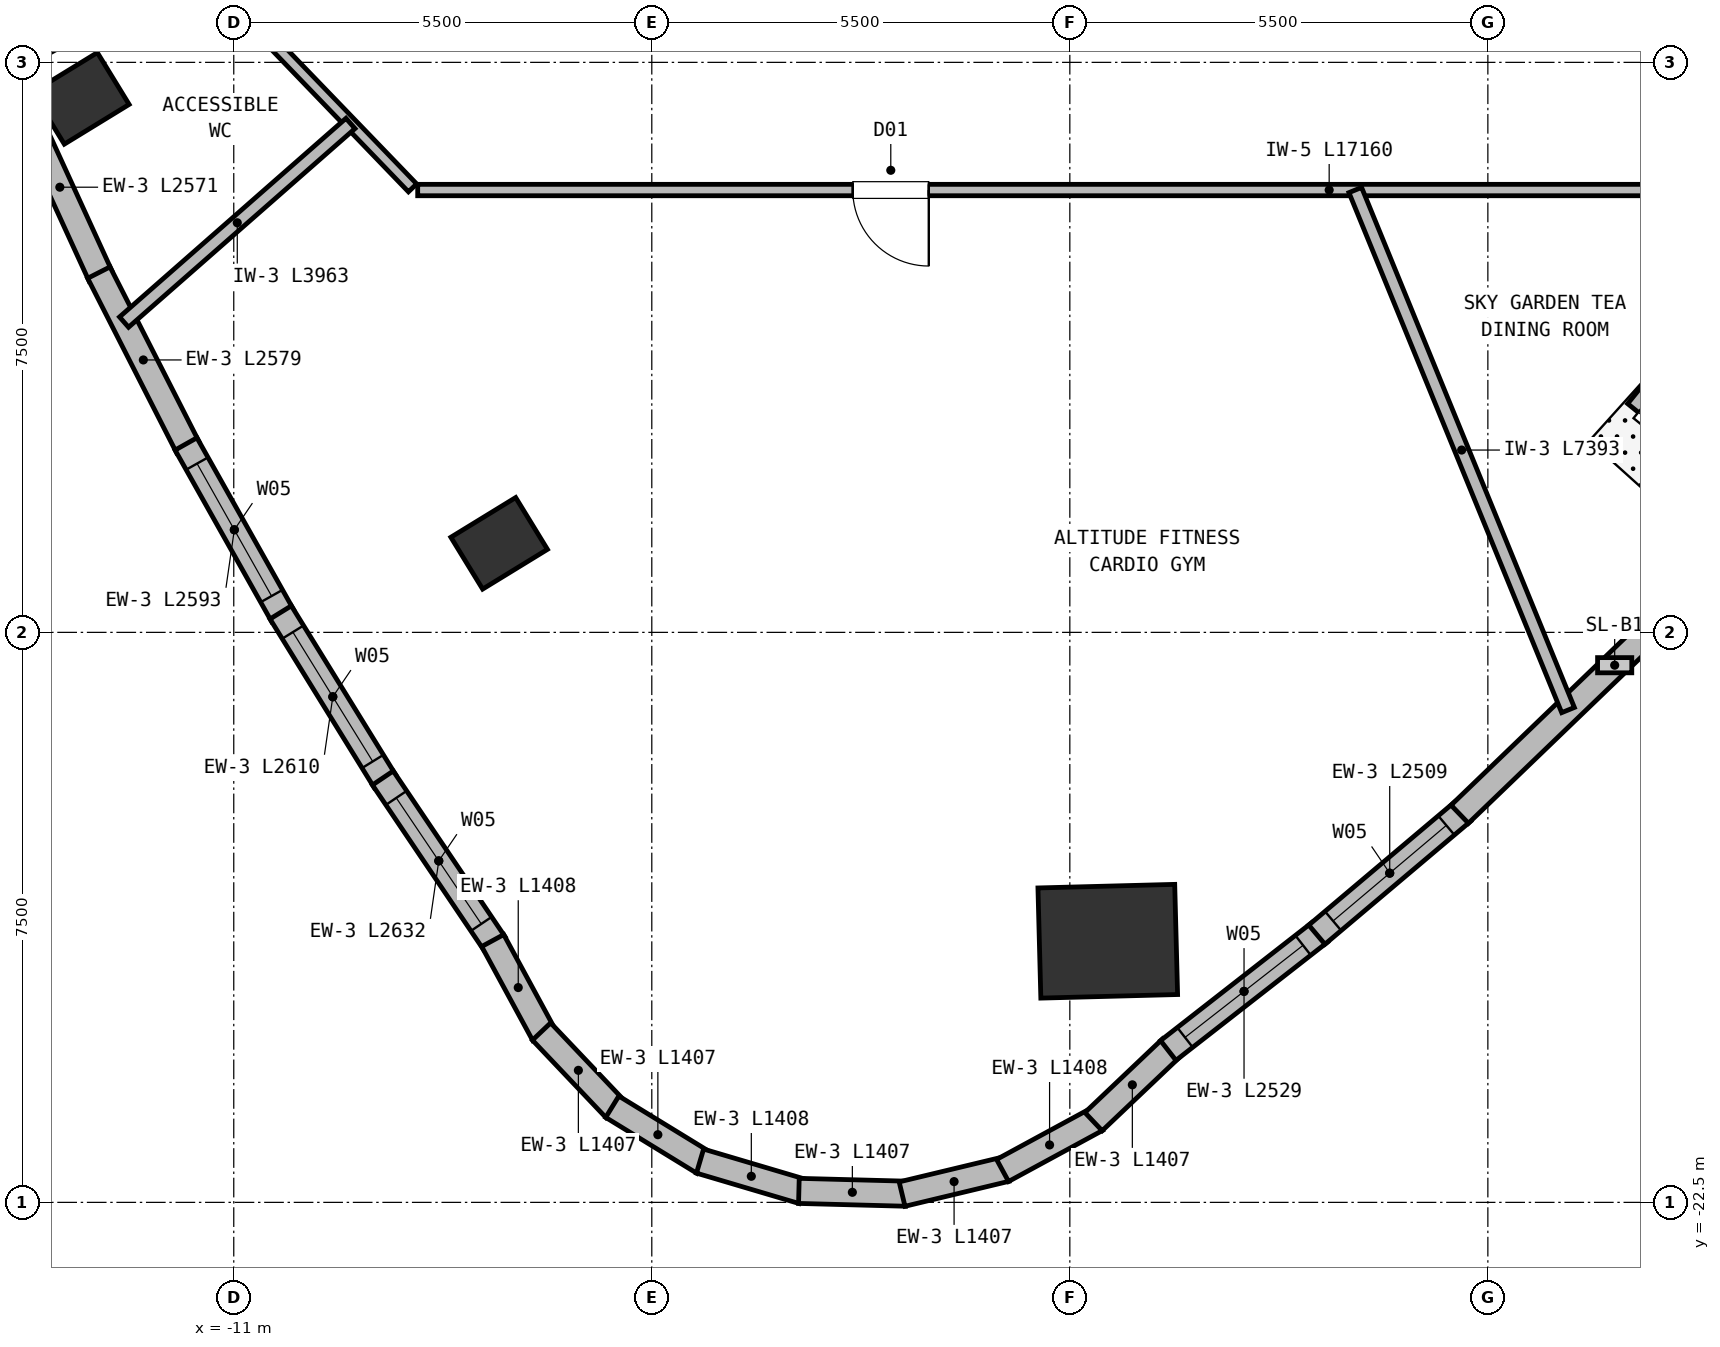
"""IFC4 building model, lengths in metres.
Left out: names, types, materials, properties, quantities, classifications, styles, units other than length and angle.
Written with IfcOpenShell. Run it as: python <this file> out.ifc"""

import sys

from ifc_helpers import new_model, si_unit, direction, frame, frame_2d, origin, origin_2d, place, context, subcontext, project, spatial, rectangle, extrude, element, fill, save


model = new_model("IFC4")
c1 = context("Model", 3, precision=1e-05, world=origin(), true_north=direction((0.0, 1.0)))
c2 = subcontext(c1, "Body", "Model", "MODEL_VIEW")
j1 = project(units=[si_unit("LENGTHUNIT", "METRE"), si_unit("PLANEANGLEUNIT", "RADIAN")], contexts=[c1])
p1 = place(None, origin())
s1 = spatial("IfcSite", under=j1, at=p1, CompositionType="ELEMENT")
p2 = place(p1, origin())
s2 = spatial("IfcBuilding", under=s1, at=p2, CompositionType="ELEMENT")
p3 = place(p2, frame((0.0, 0.0, 178.25)))
s3 = spatial("IfcBuildingStorey", under=s2, at=p3, CompositionType="ELEMENT", Elevation=178.25)
for number, where, z_axis, x_axis in (
    (1, (-13.012, -7.974, 0.0), (0.0, 0.0, 1.0), (-0.522, 0.853, 0.0)),
    (2, (-7.508, -13.828, 0.0), (0.0, 0.0, 1.0), (-0.522, 0.853, 0.0)),
):
    element("IfcColumn", number, at=place(p3, frame(where, z_axis=z_axis, x_axis=x_axis)), inside=s3, PredefinedType="COLUMN", context=c2, shape_type="SweptSolid", body=[
        extrude(rectangle(XDim=0.8, YDim=1.0, at=origin_2d()), origin(), (0.0, 0.0, 1.0), 4.5),
    ])
p4 = place(p3, frame((0.499, -19.064, 0.0), z_axis=(0.0, 0.0, 1.0), x_axis=(-0.026176948308, 0.999657324976, 0.0)))
e3 = element("IfcColumn", 3, at=p4, inside=s3, PredefinedType="COLUMN", context=c2, shape_type="SweptSolid", body=[
    extrude(rectangle(XDim=1.45, YDim=1.8, at=origin_2d()), origin(), (0.0, 0.0, 1.0), 4.5),
])
p5 = place(p3, frame((13.395, -4.799, 0.0), z_axis=(0.0, 0.0, 1.0), x_axis=(-0.629314777839, -0.777150506912, 0.0)))
e4 = element("IfcWall", 4, at=p5, inside=s3, PredefinedType="SOLIDWALL", context=c2, shape_type="SweptSolid", body=[
    extrude(rectangle(XDim=9.4, YDim=0.36, at=frame_2d((4.7, 0.0))), origin(), (0.0, 0.0, 1.0), 3.93),
])
p6 = place(p5, frame((3.875, 0.0, 0.0)))
e5 = element("IfcOpeningElement", 5, at=p6, cuts=e4, PredefinedType="OPENING", context=c2, shape_type="SweptSolid", body=[
    extrude(rectangle(XDim=1.65, YDim=2.25, at=frame_2d((0.825, 1.125))), frame((0.0, 0.19, 0.0), z_axis=(0.0, -1.0, 0.0), x_axis=(1.0, 0.0, 0.0)), (0.0, 0.0, 1.0), 0.38),
])
p7 = place(p3, frame((-12.753, -10.311, 0.0), z_axis=(0.0, 0.0, 1.0), x_axis=(-0.416291659672, 0.909231133479, 0.0)))
e6 = element("IfcWall", 6, at=p7, inside=s3, PredefinedType="SOLIDWALL", context=c2, shape_type="SweptSolid", body=[
    extrude(rectangle(XDim=2.571, YDim=0.33, at=frame_2d((1.285, 0.0))), origin(), (0.0, 0.0, 1.0), 4.25),
])
p8 = place(p3, frame((-11.604, -12.565, 0.0), z_axis=(0.0, 0.0, 1.0), x_axis=(-0.453789648634, 0.891108834426, 0.0)))
e7 = element("IfcWall", 7, at=p8, inside=s3, PredefinedType="SOLIDWALL", context=c2, shape_type="SweptSolid", body=[
    extrude(rectangle(XDim=2.579, YDim=0.33, at=frame_2d((1.29, 0.0))), origin(), (0.0, 0.0, 1.0), 4.25),
])
p9 = place(p3, frame((-10.357, -14.781, 0.0), z_axis=(0.0, 0.0, 1.0), x_axis=(-0.490225473104, 0.871595654831, 0.0)))
e8 = element("IfcWall", 8, at=p9, inside=s3, PredefinedType="SOLIDWALL", context=c2, shape_type="SweptSolid", body=[
    extrude(rectangle(XDim=2.593, YDim=0.33, at=frame_2d((1.296, 0.0))), origin(), (0.0, 0.0, 1.0), 4.25),
])
p10 = place(p9, frame((0.296, 0.0, 0.72)))
e9 = element("IfcOpeningElement", 9, at=p10, cuts=e8, PredefinedType="OPENING", context=c2, shape_type="SweptSolid", body=[
    extrude(rectangle(XDim=2.0, YDim=2.15, at=frame_2d((1.0, 1.075))), frame((0.0, 0.175, 0.0), z_axis=(0.0, -1.0, 0.0), x_axis=(1.0, 0.0, 0.0)), (0.0, 0.0, 1.0), 0.35),
])
p11 = place(p3, frame((-9.011, -16.958, 0.0), z_axis=(0.0, 0.0, 1.0), x_axis=(-0.52534948034, 0.85088655149, 0.0)))
e10 = element("IfcWall", 10, at=p11, inside=s3, PredefinedType="SOLIDWALL", context=c2, shape_type="SweptSolid", body=[
    extrude(rectangle(XDim=2.61, YDim=0.33, at=frame_2d((1.305, 0.0))), origin(), (0.0, 0.0, 1.0), 4.25),
])
p12 = place(p11, frame((0.305, 0.0, 0.72)))
e11 = element("IfcOpeningElement", 11, at=p12, cuts=e10, PredefinedType="OPENING", context=c2, shape_type="SweptSolid", body=[
    extrude(rectangle(XDim=2.0, YDim=2.15, at=frame_2d((1.0, 1.075))), frame((0.0, 0.175, 0.0), z_axis=(0.0, -1.0, 0.0), x_axis=(1.0, 0.0, 0.0)), (0.0, 0.0, 1.0), 0.35),
])
p13 = place(p3, frame((-7.567, -19.098, 0.0), z_axis=(0.0, 0.0, 1.0), x_axis=(-0.559187636115, 0.829041125407, 0.0)))
e12 = element("IfcWall", 12, at=p13, inside=s3, PredefinedType="SOLIDWALL", context=c2, shape_type="SweptSolid", body=[
    extrude(rectangle(XDim=2.632, YDim=0.33, at=frame_2d((1.316, 0.0))), origin(), (0.0, 0.0, 1.0), 4.25),
])
p14 = place(p13, frame((0.316, 0.0, 0.72)))
e13 = element("IfcOpeningElement", 13, at=p14, cuts=e12, PredefinedType="OPENING", context=c2, shape_type="SweptSolid", body=[
    extrude(rectangle(XDim=2.0, YDim=2.15, at=frame_2d((1.0, 1.075))), frame((0.0, 0.175, 0.0), z_axis=(0.0, -1.0, 0.0), x_axis=(1.0, 0.0, 0.0)), (0.0, 0.0, 1.0), 0.35),
])
p15 = place(p3, frame((-6.921, -20.292, 0.0), z_axis=(0.0, 0.0, 1.0), x_axis=(-0.477137792558, 0.878828496871, 0.0)))
e14 = element("IfcWall", 14, at=p15, inside=s3, PredefinedType="SOLIDWALL", context=c2, shape_type="SweptSolid", body=[
    extrude(rectangle(XDim=1.408, YDim=0.33, at=frame_2d((0.704, 0.0))), origin(), (0.0, 0.0, 1.0), 4.25),
])
p16 = place(p3, frame((-5.982, -21.273, 0.0), z_axis=(0.0, 0.0, 1.0), x_axis=(-0.688389184298, 0.725341527104, 0.0)))
e15 = element("IfcWall", 15, at=p16, inside=s3, PredefinedType="SOLIDWALL", context=c2, shape_type="SweptSolid", body=[
    extrude(rectangle(XDim=1.407, YDim=0.33, at=frame_2d((0.704, 0.0))), origin(), (0.0, 0.0, 1.0), 4.25),
])
p17 = place(p3, frame((-4.82, -21.977, 0.0), z_axis=(0.0, 0.0, 1.0), x_axis=(-0.852603745029, 0.522557991004, 0.0)))
e16 = element("IfcWall", 16, at=p17, inside=s3, PredefinedType="SOLIDWALL", context=c2, shape_type="SweptSolid", body=[
    extrude(rectangle(XDim=1.408, YDim=0.33, at=frame_2d((0.704, 0.0))), origin(), (0.0, 0.0, 1.0), 4.25),
])
for number, where, z_axis, x_axis in (
    (17, (-3.516, -22.357, 0.0), (0.0, 0.0, 1.0), (-0.959, 0.284, 0.0)),
    (18, (-2.158, -22.386, 0.0), (0.0, 0.0, 1.0), (-1.0, 0.026, 0.0)),
):
    element("IfcWall", number, at=place(p3, frame(where, z_axis=z_axis, x_axis=x_axis)), inside=s3, PredefinedType="SOLIDWALL", context=c2, shape_type="SweptSolid", body=[
        extrude(rectangle(XDim=1.407, YDim=0.33, at=frame_2d((0.704, 0.0))), origin(), (0.0, 0.0, 1.0), 4.25),
    ])
p18 = place(p3, frame((-0.839, -22.062, 0.0), z_axis=(0.0, 0.0, 1.0), x_axis=(-0.972355799013, -0.23350417582, 0.0)))
e19 = element("IfcWall", 19, at=p18, inside=s3, PredefinedType="SOLIDWALL", context=c2, shape_type="SweptSolid", body=[
    extrude(rectangle(XDim=1.407, YDim=0.33, at=frame_2d((0.704, 0.0))), origin(), (0.0, 0.0, 1.0), 4.25),
])
for number, where, z_axis, x_axis in (
    (20, (0.352, -21.409, 0.0), (0.0, 0.0, 1.0), (-0.879, -0.477, 0.0)),
    (21, (1.333, -20.469, 0.0), (0.0, 0.0, 1.0), (-0.725, -0.688, 0.0)),
):
    element("IfcWall", number, at=place(p3, frame(where, z_axis=z_axis, x_axis=x_axis)), inside=s3, PredefinedType="SOLIDWALL", context=c2, shape_type="SweptSolid", body=[
        extrude(rectangle(XDim=1.407, YDim=0.33, at=frame_2d((0.704, 0.0))), origin(), (0.0, 0.0, 1.0), 4.25),
    ])
p19 = place(p3, frame((3.289, -18.946, 0.0), z_axis=(0.0, 0.0, 1.0), x_axis=(-0.788384305727, -0.615183051199, 0.0)))
e22 = element("IfcWall", 22, at=p19, inside=s3, PredefinedType="SOLIDWALL", context=c2, shape_type="SweptSolid", body=[
    extrude(rectangle(XDim=2.529, YDim=0.33, at=frame_2d((1.264, 0.0))), origin(), (0.0, 0.0, 1.0), 4.25),
])
p20 = place(p19, frame((0.279, 0.0, 0.72)))
e23 = element("IfcOpeningElement", 23, at=p20, cuts=e22, PredefinedType="OPENING", context=c2, shape_type="SweptSolid", body=[
    extrude(rectangle(XDim=1.97, YDim=2.15, at=frame_2d((0.985, 1.075))), frame((0.0, 0.175, 0.0), z_axis=(0.0, -1.0, 0.0), x_axis=(1.0, 0.0, 0.0)), (0.0, 0.0, 1.0), 0.35),
])
p21 = place(p3, frame((5.167, -17.359, 0.0), z_axis=(0.0, 0.0, 1.0), x_axis=(-0.764194051391, -0.644986396615, 0.0)))
e24 = element("IfcWall", 24, at=p21, inside=s3, PredefinedType="SOLIDWALL", context=c2, shape_type="SweptSolid", body=[
    extrude(rectangle(XDim=2.509, YDim=0.33, at=frame_2d((1.254, 0.0))), origin(), (0.0, 0.0, 1.0), 4.25),
])
p22 = place(p21, frame((0.279, 0.0, 0.72)))
e25 = element("IfcOpeningElement", 25, at=p22, cuts=e24, PredefinedType="OPENING", context=c2, shape_type="SweptSolid", body=[
    extrude(rectangle(XDim=1.95, YDim=2.15, at=frame_2d((0.975, 1.075))), frame((0.0, 0.175, 0.0), z_axis=(0.0, -1.0, 0.0), x_axis=(1.0, 0.0, 0.0)), (0.0, 0.0, 1.0), 0.35),
])
p23 = place(p3, frame((9.207, -13.471, 0.0), z_axis=(0.0, 0.0, 1.0), x_axis=(-0.720698692284, -0.693248436667, 0.0)))
e26 = element("IfcWall", 26, at=p23, inside=s3, PredefinedType="SOLIDWALL", context=c2, shape_type="SweptSolid", body=[
    extrude(rectangle(XDim=5.656, YDim=0.33, at=frame_2d((2.828, 0.0))), origin(), (0.0, 0.0, 1.0), 4.25),
])
p24 = place(p3, frame((8.58, -9.18, 0.0), z_axis=(0.0, 0.0, 1.0), x_axis=(-1.0, 0.0, 0.0)))
e27 = element("IfcWall", 27, at=p24, inside=s3, PredefinedType="PARTITIONING", context=c2, shape_type="SweptSolid", body=[
    extrude(rectangle(XDim=17.16, YDim=0.15, at=frame_2d((8.58, 0.0))), origin(), (0.0, 0.0, 1.0), 3.93),
])
p25 = place(p24, frame((10.436, 0.0, 0.0)))
e28 = element("IfcOpeningElement", 28, at=p25, cuts=e27, PredefinedType="OPENING", context=c2, shape_type="SweptSolid", body=[
    extrude(rectangle(XDim=1.0, YDim=2.15, at=frame_2d((0.5, 1.075))), frame((0.0, 0.085, 0.0), z_axis=(0.0, -1.0, 0.0), x_axis=(1.0, 0.0, 0.0)), (0.0, 0.0, 1.0), 0.17),
])
p26 = place(p3, frame((-8.648, -9.151, 0.0), z_axis=(0.0, 0.0, 1.0), x_axis=(-0.693764562202, 0.720201869085, 0.0)))
e29 = element("IfcWall", 29, at=p26, inside=s3, PredefinedType="PARTITIONING", context=c2, shape_type="SweptSolid", body=[
    extrude(rectangle(XDim=2.558, YDim=0.15, at=frame_2d((1.279, 0.0))), origin(), (0.0, 0.0, 1.0), 3.93),
])
p27 = place(p3, frame((-9.464, -8.304, 0.0), z_axis=(0.0, 0.0, 1.0), x_axis=(-0.75170982187, -0.659494005813, 0.0)))
e30 = element("IfcWall", 30, at=p27, inside=s3, PredefinedType="PARTITIONING", context=c2, shape_type="SweptSolid", body=[
    extrude(rectangle(XDim=3.963, YDim=0.18, at=frame_2d((1.982, 0.0))), origin(), (0.0, 0.0, 1.0), 4.25),
])
p28 = place(p3, frame((3.756, -9.18, 0.0), z_axis=(0.0, 0.0, 1.0), x_axis=(0.378655991799, -0.925537487018, 0.0)))
e31 = element("IfcWall", 31, at=p28, inside=s3, PredefinedType="PARTITIONING", context=c2, shape_type="SweptSolid", body=[
    extrude(rectangle(XDim=7.393, YDim=0.18, at=frame_2d((3.696, 0.0))), origin(), (0.0, 0.0, 1.0), 4.25),
])
p29 = place(p3, frame((-10.45, -5.665, 0.0), z_axis=(0.0, 0.0, 1.0), x_axis=(-0.879150933039, -0.476543426077, 0.0)))
e32 = element("IfcWall", 32, at=p29, inside=s3, PredefinedType="PARTITIONING", context=c2, shape_type="SweptSolid", body=[
    extrude(rectangle(XDim=4.019, YDim=0.18, at=frame_2d((2.009, 0.0))), origin(), (0.0, 0.0, 1.0), 4.25),
])
p30 = place(p10, origin())
e33 = element("IfcWindow", 33, at=p30, inside=s3, PartitioningType="SINGLE_PANEL", PredefinedType="WINDOW", context=c2, shape_type="SweptSolid", body=[
    extrude(rectangle(XDim=2.0, YDim=2.15, at=frame_2d((1.0, 1.075))), frame((0.0, 0.03, 0.0), z_axis=(0.0, -1.0, 0.0), x_axis=(1.0, 0.0, 0.0)), (0.0, 0.0, 1.0), 0.06),
])
fill(e9, e33)
p31 = place(p12, origin())
e34 = element("IfcWindow", 34, at=p31, inside=s3, PartitioningType="SINGLE_PANEL", PredefinedType="WINDOW", context=c2, shape_type="SweptSolid", body=[
    extrude(rectangle(XDim=2.0, YDim=2.15, at=frame_2d((1.0, 1.075))), frame((0.0, 0.03, 0.0), z_axis=(0.0, -1.0, 0.0), x_axis=(1.0, 0.0, 0.0)), (0.0, 0.0, 1.0), 0.06),
])
fill(e11, e34)
p32 = place(p14, origin())
e35 = element("IfcWindow", 35, at=p32, inside=s3, PartitioningType="SINGLE_PANEL", PredefinedType="WINDOW", context=c2, shape_type="SweptSolid", body=[
    extrude(rectangle(XDim=2.0, YDim=2.15, at=frame_2d((1.0, 1.075))), frame((0.0, 0.03, 0.0), z_axis=(0.0, -1.0, 0.0), x_axis=(1.0, 0.0, 0.0)), (0.0, 0.0, 1.0), 0.06),
])
fill(e13, e35)
p33 = place(p20, origin())
e36 = element("IfcWindow", 36, at=p33, inside=s3, PartitioningType="SINGLE_PANEL", PredefinedType="WINDOW", context=c2, shape_type="SweptSolid", body=[
    extrude(rectangle(XDim=1.97, YDim=2.15, at=frame_2d((0.985, 1.075))), frame((0.0, 0.03, 0.0), z_axis=(0.0, -1.0, 0.0), x_axis=(1.0, 0.0, 0.0)), (0.0, 0.0, 1.0), 0.06),
])
fill(e23, e36)
p34 = place(p22, origin())
e37 = element("IfcWindow", 37, at=p34, inside=s3, PartitioningType="SINGLE_PANEL", PredefinedType="WINDOW", context=c2, shape_type="SweptSolid", body=[
    extrude(rectangle(XDim=1.95, YDim=2.15, at=frame_2d((0.975, 1.075))), frame((0.0, 0.03, 0.0), z_axis=(0.0, -1.0, 0.0), x_axis=(1.0, 0.0, 0.0)), (0.0, 0.0, 1.0), 0.06),
])
fill(e25, e37)
p35 = place(p25, origin())
e38 = element("IfcDoor", 38, at=p35, inside=s3, OperationType="SINGLE_SWING_LEFT", PredefinedType="DOOR", context=c2, shape_type="SweptSolid", body=[
    extrude(rectangle(XDim=1.0, YDim=2.15, at=frame_2d((0.5, 1.075))), frame((0.0, 0.025, 0.0), z_axis=(0.0, -1.0, 0.0), x_axis=(1.0, 0.0, 0.0)), (0.0, 0.0, 1.0), 0.05),
])
fill(e28, e38)
save(model, sys.argv[1])
